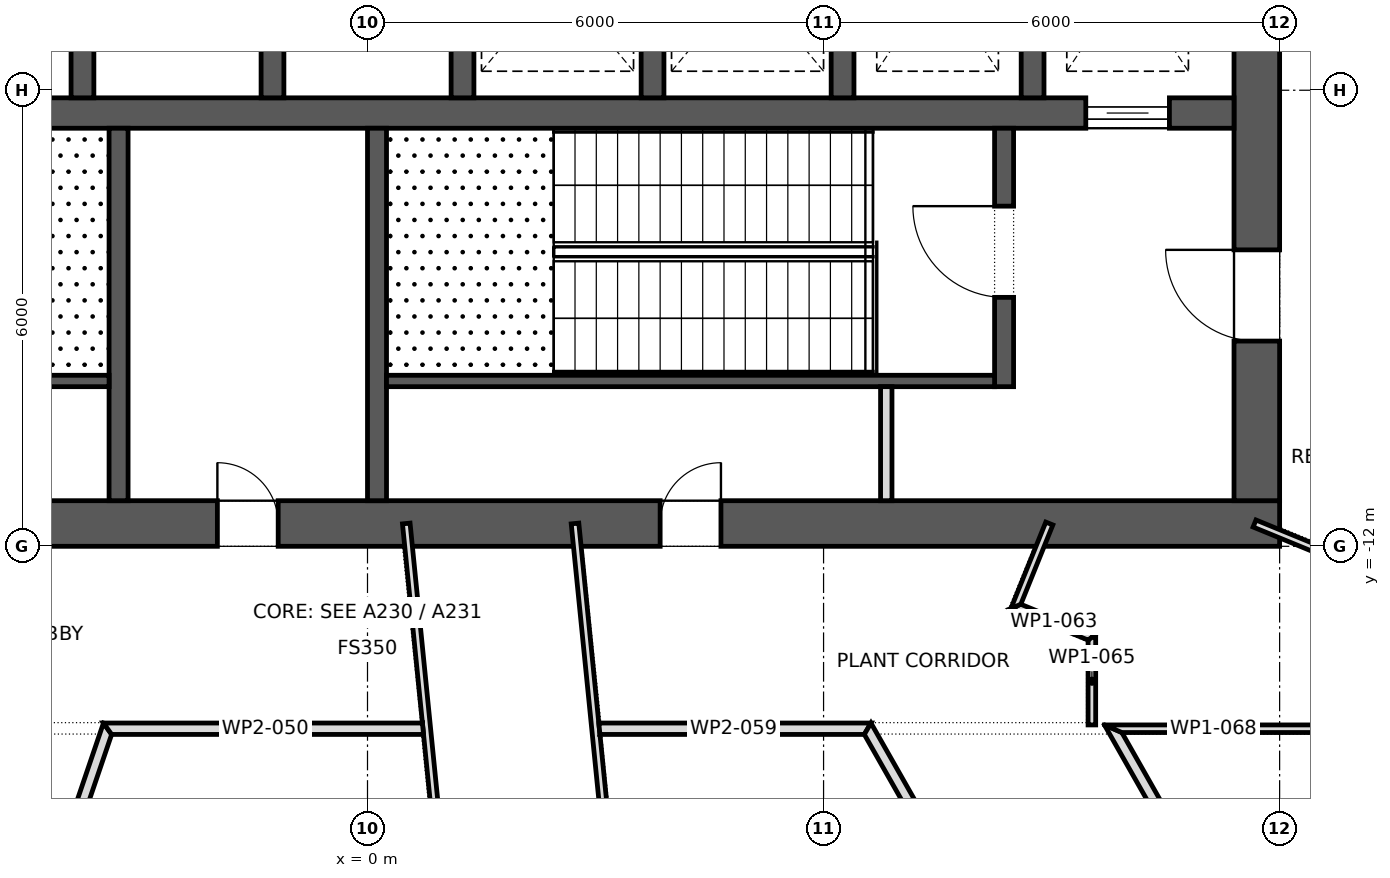
"""IFC4 building model, lengths in metres.
Left out: names, types, materials, properties, quantities, classifications, styles, units other than length and angle.
Written with IfcOpenShell. Run it as: python <this file> out.ifc"""

import sys

from ifc_helpers import new_model, si_unit, direction, frame, frame_2d, origin, place, context, subcontext, project, spatial, polyline, rectangle, outline, extrude, element, fill, save


model = new_model("IFC4")
c1 = context("Model", 3, precision=1e-05, world=origin(), true_north=direction((0.0, 1.0)))
c2 = subcontext(c1, "Body", "Model", "MODEL_VIEW")
j1 = project(units=[si_unit("LENGTHUNIT", "METRE"), si_unit("PLANEANGLEUNIT", "RADIAN")], contexts=[c1])
p1 = place(None, origin())
s1 = spatial("IfcSite", under=j1, at=p1, CompositionType="ELEMENT")
p2 = place(p1, origin())
s2 = spatial("IfcBuilding", under=s1, at=p2, CompositionType="ELEMENT")
p3 = place(p2, frame((0.0, 0.0, 99.1)))
s3 = spatial("IfcBuildingStorey", under=s2, at=p3, CompositionType="ELEMENT", Elevation=99.1)
p4 = place(p3, frame((-12.0, -11.7, 0.0), z_axis=(0.0, 0.0, 1.0), x_axis=(1.0, 0.0, 0.0)))
e1 = element("IfcWall", 1, at=p4, inside=s3, PredefinedType="SHEAR", context=c2, shape_type="SweptSolid", body=[
    extrude(rectangle(XDim=24.0, YDim=0.6, at=frame_2d((12.0, 0.0))), origin(), (0.0, 0.0, 1.0), 5.4),
])
p5 = place(p4, frame((10.025, 0.0, 0.0)))
e2 = element("IfcOpeningElement", 2, at=p5, cuts=e1, PredefinedType="OPENING", context=c2, shape_type="SweptSolid", body=[
    extrude(rectangle(XDim=0.8, YDim=2.1, at=frame_2d((0.4, 1.05))), frame((0.0, 0.312, 0.0), z_axis=(0.0, -1.0, 0.0), x_axis=(1.0, 0.0, 0.0)), (0.0, 0.0, 1.0), 0.624),
])
p6 = place(p4, frame((4.2, 0.0, 0.0)))
e3 = element("IfcOpeningElement", 3, at=p6, cuts=e1, PredefinedType="OPENING", context=c2, shape_type="SweptSolid", body=[
    extrude(rectangle(XDim=0.8, YDim=2.1, at=frame_2d((0.4, 1.05))), frame((0.0, 0.312, 0.0), z_axis=(0.0, -1.0, 0.0), x_axis=(1.0, 0.0, 0.0)), (0.0, 0.0, 1.0), 0.624),
])
p7 = place(p4, frame((15.85, 0.0, 0.0)))
e4 = element("IfcOpeningElement", 4, at=p7, cuts=e1, PredefinedType="OPENING", context=c2, shape_type="SweptSolid", body=[
    extrude(rectangle(XDim=0.8, YDim=2.1, at=frame_2d((0.4, 1.05))), frame((0.0, 0.312, 0.0), z_axis=(0.0, -1.0, 0.0), x_axis=(1.0, 0.0, 0.0)), (0.0, 0.0, 1.0), 0.624),
])
p8 = place(p3, frame((11.7, -11.4, 0.0), z_axis=(0.0, 0.0, 1.0), x_axis=(0.0, 1.0, 0.0)))
e5 = element("IfcWall", 5, at=p8, inside=s3, PredefinedType="SHEAR", context=c2, shape_type="SweptSolid", body=[
    extrude(rectangle(XDim=22.8, YDim=0.6, at=frame_2d((11.4, 0.0))), origin(), (0.0, 0.0, 1.0), 5.4),
])
p9 = place(p8, frame((10.2, 0.0, 0.0)))
e6 = element("IfcOpeningElement", 6, at=p9, cuts=e5, PredefinedType="OPENING", context=c2, shape_type="SweptSolid", body=[
    extrude(rectangle(XDim=2.4, YDim=2.1, at=frame_2d((1.2, 1.05))), frame((0.0, 0.312, 0.0), z_axis=(0.0, -1.0, 0.0), x_axis=(1.0, 0.0, 0.0)), (0.0, 0.0, 1.0), 0.624),
])
p10 = place(p8, frame((19.5, 0.0, 0.0)))
e7 = element("IfcOpeningElement", 7, at=p10, cuts=e5, PredefinedType="OPENING", context=c2, shape_type="SweptSolid", body=[
    extrude(rectangle(XDim=1.2, YDim=2.1, at=frame_2d((0.6, 1.05))), frame((0.0, 0.312, 0.0), z_axis=(0.0, -1.0, 0.0), x_axis=(1.0, 0.0, 0.0)), (0.0, 0.0, 1.0), 0.624),
])
p11 = place(p8, frame((2.1, 0.0, 0.0)))
e8 = element("IfcOpeningElement", 8, at=p11, cuts=e5, PredefinedType="OPENING", context=c2, shape_type="SweptSolid", body=[
    extrude(rectangle(XDim=1.2, YDim=2.1, at=frame_2d((0.6, 1.05))), frame((0.0, 0.312, 0.0), z_axis=(0.0, -1.0, 0.0), x_axis=(1.0, 0.0, 0.0)), (0.0, 0.0, 1.0), 0.624),
])
p12 = place(p3, frame((-11.4, -6.3, 0.0), z_axis=(0.0, 0.0, 1.0), x_axis=(1.0, 0.0, 0.0)))
e9 = element("IfcWall", 9, at=p12, inside=s3, PredefinedType="SHEAR", context=c2, shape_type="SweptSolid", body=[
    extrude(rectangle(XDim=22.8, YDim=0.4, at=frame_2d((11.4, 0.0))), origin(), (0.0, 0.0, 1.0), 5.4),
])
p13 = place(p12, frame((20.85, 0.0, 0.0)))
e10 = element("IfcOpeningElement", 10, at=p13, cuts=e9, PredefinedType="OPENING", context=c2, shape_type="SweptSolid", body=[
    extrude(rectangle(XDim=1.1, YDim=2.1, at=frame_2d((0.55, 1.05))), frame((0.0, 0.212, 0.0), z_axis=(0.0, -1.0, 0.0), x_axis=(1.0, 0.0, 0.0)), (0.0, 0.0, 1.0), 0.424),
])
for number, where, z_axis, x_axis in (
    (11, (-3.75, -6.1, 0.0), (0.0, 0.0, 1.0), (0.0, 1.0, 0.0)),
    (12, (-1.25, -6.1, 0.0), (0.0, 0.0, 1.0), (0.0, 1.0, 0.0)),
    (13, (1.25, -6.1, 0.0), (0.0, 0.0, 1.0), (0.0, 1.0, 0.0)),
    (14, (3.75, -6.1, 0.0), (0.0, 0.0, 1.0), (0.0, 1.0, 0.0)),
    (15, (6.25, -6.1, 0.0), (0.0, 0.0, 1.0), (0.0, 1.0, 0.0)),
    (16, (8.75, -6.1, 0.0), (0.0, 0.0, 1.0), (0.0, 1.0, 0.0)),
):
    element("IfcWall", number, at=place(p3, frame(where, z_axis=z_axis, x_axis=x_axis)), inside=s3, PredefinedType="SHEAR", context=c2, shape_type="SweptSolid", body=[
        extrude(rectangle(XDim=2.9, YDim=0.3, at=frame_2d((1.45, 0.0))), origin(), (0.0, 0.0, 1.0), 5.4),
    ])
for number, where, z_axis, x_axis in (
    (17, (-3.275, -11.4, 0.0), (0.0, 0.0, 1.0), (0.0, 1.0, 0.0)),
    (18, (0.125, -11.4, 0.0), (0.0, 0.0, 1.0), (0.0, 1.0, 0.0)),
):
    element("IfcWall", number, at=place(p3, frame(where, z_axis=z_axis, x_axis=x_axis)), inside=s3, PredefinedType="SHEAR", context=c2, shape_type="SweptSolid", body=[
        extrude(rectangle(XDim=4.9, YDim=0.25, at=frame_2d((2.45, 0.0))), origin(), (0.0, 0.0, 1.0), 5.1),
    ])
p14 = place(p3, frame((8.375, -9.9, 0.0), z_axis=(0.0, 0.0, 1.0), x_axis=(0.0, 1.0, 0.0)))
e19 = element("IfcWall", 19, at=p14, inside=s3, PredefinedType="SHEAR", context=c2, shape_type="SweptSolid", body=[
    extrude(rectangle(XDim=3.4, YDim=0.25, at=frame_2d((1.7, 0.0))), origin(), (0.0, 0.0, 1.0), 5.1),
])
p15 = place(p14, frame((1.175, 0.0, 0.0)))
e20 = element("IfcOpeningElement", 20, at=p15, cuts=e19, PredefinedType="OPENING", context=c2, shape_type="SweptSolid", body=[
    extrude(rectangle(XDim=1.2, YDim=2.1, at=frame_2d((0.6, 1.05))), frame((0.0, 0.137, 0.0), z_axis=(0.0, -1.0, 0.0), x_axis=(1.0, 0.0, 0.0)), (0.0, 0.0, 1.0), 0.274),
])
for number, where, z_axis, x_axis in (
    (21, (-11.4, -9.825, 0.0), (0.0, 0.0, 1.0), (1.0, 0.0, 0.0)),
    (22, (0.25, -9.825, 0.0), (0.0, 0.0, 1.0), (1.0, 0.0, 0.0)),
):
    element("IfcWall", number, at=place(p3, frame(where, z_axis=z_axis, x_axis=x_axis)), inside=s3, PredefinedType="SHEAR", context=c2, shape_type="SweptSolid", body=[
        extrude(rectangle(XDim=8.0, YDim=0.15, at=frame_2d((4.0, 0.0))), origin(), (0.0, 0.0, 1.0), 5.1),
    ])
p16 = place(p3, frame((6.825, -11.4, 0.0), z_axis=(0.0, 0.0, 1.0), x_axis=(0.0, 1.0, 0.0)))
e23 = element("IfcWall", 23, at=p16, inside=s3, PredefinedType="PARTITIONING", context=c2, shape_type="SweptSolid", body=[
    extrude(rectangle(XDim=1.5, YDim=0.15, at=frame_2d((0.75, 0.0))), origin(), (0.0, 0.0, 1.0), 5.1),
])
p17 = place(p3, frame((-3.403, -14.349, 0.0), z_axis=(0.0, 0.0, 1.0), x_axis=(-0.32208303293, -0.946711423771, 0.0)))
e24 = element("IfcWall", 24, at=p17, inside=s3, PredefinedType="PARTITIONING", context=c2, shape_type="SweptSolid", body=[
    extrude(outline(polyline([(0.0, -0.075), (1.994, -0.075), (3.988, -0.075), (5.982, -0.075), (7.976, -0.075), (9.97, -0.075), (11.964, -0.075), (13.958, -0.075), (13.782, 0.075), (11.829, 0.075), (9.875, 0.075), (7.922, 0.075), (5.968, 0.075), (4.015, 0.075), (2.061, 0.075), (0.107, 0.075), (0.0, -0.075)])), origin(), (0.0, 0.0, 1.0), 5.1),
])
p18 = place(p17, frame((6.462, 0.0, 0.0)))
e25 = element("IfcOpeningElement", 25, at=p18, cuts=e24, PredefinedType="OPENING", context=c2, shape_type="SweptSolid", body=[
    extrude(rectangle(XDim=1.0, YDim=2.1, at=frame_2d((0.5, 1.05))), frame((0.0, 0.087, 0.0), z_axis=(0.0, -1.0, 0.0), x_axis=(1.0, 0.0, 0.0)), (0.0, 0.0, 1.0), 0.174),
])
p19 = place(p3, frame((0.51, -11.7, 0.0), z_axis=(0.0, 0.0, 1.0), x_axis=(0.09951245757, -0.995036316316, 0.0)))
e26 = element("IfcWall", 26, at=p19, inside=s3, PredefinedType="PARTITIONING", context=c2, shape_type="SweptSolid", body=[
    extrude(outline(polyline([(0.0, -0.05), (1.317, -0.05), (2.633, -0.05), (2.633, -0.05), (2.636, -0.05), (4.625, -0.05), (6.615, -0.05), (8.604, -0.05), (10.594, -0.05), (12.583, -0.05), (14.573, -0.05), (16.562, -0.05), (16.568, 0.011), (16.593, 0.009), (16.597, 0.045), (16.597, 0.05), (14.753, 0.05), (12.909, 0.05), (11.065, 0.05), (9.22, 0.05), (7.376, 0.05), (5.532, 0.05), (3.688, 0.05), (1.844, 0.05), (0.0, 0.05), (0.0, -0.05)])), origin(), (0.0, 0.0, 1.0), 5.1),
])
p20 = place(p3, frame((0.737, -14.4, 0.0), z_axis=(0.0, 0.0, 1.0), x_axis=(-1.0, 0.0, 0.0)))
e27 = element("IfcWall", 27, at=p20, inside=s3, PredefinedType="PARTITIONING", context=c2, shape_type="SweptSolid", body=[
    extrude(outline(polyline([(4.211, -0.075), (4.211, -0.075), (4.157, 0.0), (4.104, 0.075), (2.736, 0.075), (1.368, 0.075), (0.0, 0.075), (0.0, 0.073), (0.015, -0.075), (1.413, -0.075), (2.812, -0.075), (4.211, -0.075)])), origin(), (0.0, 0.0, 1.0), 5.1),
])
p21 = place(p3, frame((2.73, -11.7, 0.0), z_axis=(0.0, 0.0, 1.0), x_axis=(0.099620052523, -0.995025549991, 0.0)))
e28 = element("IfcWall", 28, at=p21, inside=s3, PredefinedType="PARTITIONING", context=c2, shape_type="SweptSolid", body=[
    extrude(outline(polyline([(16.415, -0.05), (16.415, -0.042), (16.412, -0.003), (16.415, -0.003), (16.415, -0.003), (16.387, -0.005), (16.383, 0.05), (14.442, 0.05), (12.5, 0.05), (10.559, 0.05), (8.618, 0.05), (6.677, 0.05), (4.735, 0.05), (2.794, 0.05), (2.794, 0.05), (2.788, 0.05), (1.394, 0.05), (0.0, 0.05), (0.0, -0.05), (1.824, -0.05), (3.648, -0.05), (5.472, -0.05), (7.295, -0.05), (9.119, -0.05), (10.943, -0.05), (12.767, -0.05), (14.591, -0.05), (16.415, -0.05)])), origin(), (0.0, 0.0, 1.0), 5.1),
])
p22 = place(p3, frame((6.624, -14.4, 0.0), z_axis=(0.0, 0.0, 1.0), x_axis=(-1.0, 0.0, 0.0)))
e29 = element("IfcWall", 29, at=p22, inside=s3, PredefinedType="PARTITIONING", context=c2, shape_type="SweptSolid", body=[
    extrude(outline(polyline([(3.58, -0.075), (3.58, -0.071), (3.565, 0.075), (1.826, 0.075), (0.087, 0.075), (0.043, 0.0), (0.0, -0.075), (0.0, -0.075), (1.79, -0.075), (3.58, -0.075)])), origin(), (0.0, 0.0, 1.0), 5.1),
])
p23 = place(p3, frame((6.558, -14.362, 0.0), z_axis=(0.0, 0.0, 1.0), x_axis=(0.494364889709, -0.869254482774, 0.0)))
e30 = element("IfcWall", 30, at=p23, inside=s3, PredefinedType="PARTITIONING", context=c2, shape_type="SweptSolid", body=[
    extrude(outline(polyline([(0.087, -0.075), (1.971, -0.075), (3.854, -0.075), (5.737, -0.075), (7.621, -0.075), (9.504, -0.075), (11.387, -0.075), (13.271, -0.075), (13.45, 0.075), (11.529, 0.075), (9.607, 0.075), (7.686, 0.075), (5.764, 0.075), (3.843, 0.075), (1.922, 0.075), (0.0, 0.075), (0.087, -0.075)])), origin(), (0.0, 0.0, 1.0), 5.1),
])
p24 = place(p3, frame((8.484, -12.771, 0.0), z_axis=(0.0, 0.0, 1.0), x_axis=(0.92524601645, -0.379367643644, 0.0)))
e31 = element("IfcWall", 31, at=p24, inside=s3, PredefinedType="PARTITIONING", context=c2, shape_type="SweptSolid", body=[
    extrude(outline(polyline([(0.0, -0.05), (1.097, -0.05), (1.164, 0.05), (1.164, 0.05), (0.1, 0.05), (0.0, -0.05)])), origin(), (0.0, 0.0, 1.0), 5.1),
])
p25 = place(p3, frame((8.97, -11.7, 0.0), z_axis=(0.0, 0.0, 1.0), x_axis=(-0.374206059245, -0.927345580258, 0.0)))
e32 = element("IfcWall", 32, at=p25, inside=s3, PredefinedType="PARTITIONING", context=c2, shape_type="SweptSolid", body=[
    extrude(outline(polyline([(0.0, -0.05), (1.225, -0.05), (1.126, 0.05), (0.0, 0.05), (0.0, -0.05)])), origin(), (0.0, 0.0, 1.0), 5.1),
])
p26 = place(p3, frame((9.53, -13.167, 0.0), z_axis=(0.0, 0.0, 1.0), x_axis=(0.0, -1.0, 0.0)))
e33 = element("IfcWall", 33, at=p26, inside=s3, PredefinedType="PARTITIONING", context=c2, shape_type="SweptSolid", body=[
    extrude(outline(polyline([(0.0, 0.05), (0.0, 0.05), (0.067, -0.05), (1.184, -0.05), (1.184, 0.05), (0.0, 0.05)])), origin(), (0.0, 0.0, 1.0), 5.1),
])
p27 = place(p3, frame((9.76, -14.313, 0.0), z_axis=(0.0, 0.0, 1.0), x_axis=(0.493758679804, -0.869598968558, 0.0)))
e34 = element("IfcWall", 34, at=p27, inside=s3, PredefinedType="PARTITIONING", context=c2, shape_type="SweptSolid", body=[
    extrude(outline(polyline([(0.0, -0.075), (1.773, -0.075), (3.547, -0.075), (5.32, -0.075), (7.094, -0.075), (8.867, -0.075), (10.641, -0.075), (12.414, -0.075), (12.264, 0.075), (10.54, 0.075), (8.817, 0.075), (7.094, 0.075), (5.37, 0.075), (3.647, 0.075), (1.923, 0.075), (0.2, 0.075), (0.0, -0.075), (0.0, -0.075)])), origin(), (0.0, 0.0, 1.0), 5.1),
])
p28 = place(p3, frame((9.695, -14.4, 0.0), z_axis=(0.0, 0.0, 1.0), x_axis=(1.0, 0.0, 0.0)))
e35 = element("IfcWall", 35, at=p28, inside=s3, PredefinedType="PARTITIONING", context=c2, shape_type="SweptSolid", body=[
    extrude(outline(polyline([(0.229, -0.05), (1.487, -0.05), (2.745, -0.05), (2.765, 0.05), (1.382, 0.05), (0.0, 0.05), (0.0, 0.05), (0.229, -0.05)])), origin(), (0.0, 0.0, 1.0), 5.1),
])
p29 = place(p3, frame((11.67, -11.7, 0.0), z_axis=(0.0, 0.0, 1.0), x_axis=(0.925020199912, -0.379917925025, 0.0)))
e36 = element("IfcWall", 36, at=p29, inside=s3, PredefinedType="PARTITIONING", context=c2, shape_type="SweptSolid", body=[
    extrude(outline(polyline([(0.0, 0.05), (0.0, -0.05), (1.721, -0.05), (3.442, -0.05), (5.163, -0.05), (6.884, -0.05), (8.605, -0.05), (10.326, -0.05), (12.047, -0.05), (12.047, 0.05), (10.326, 0.05), (8.605, 0.05), (6.884, 0.05), (5.163, 0.05), (3.442, 0.05), (1.721, 0.05), (0.0, 0.05)])), origin(), (0.0, 0.0, 1.0), 5.1),
])
p30 = place(p13, origin())
e37 = element("IfcDoor", 37, at=p30, inside=s3, OperationType="SLIDING_TO_LEFT", PredefinedType="DOOR", context=c2, shape_type="SweptSolid", body=[
    extrude(rectangle(XDim=1.1, YDim=2.1, at=frame_2d((0.55, 1.05))), frame((0.0, 0.025, 0.0), z_axis=(0.0, -1.0, 0.0), x_axis=(1.0, 0.0, 0.0)), (0.0, 0.0, 1.0), 0.05),
])
fill(e10, e37)
p31 = place(p15, origin())
e38 = element("IfcDoor", 38, at=p31, inside=s3, OperationType="SINGLE_SWING_LEFT", PredefinedType="DOOR", context=c2, shape_type="SweptSolid", body=[
    extrude(rectangle(XDim=1.2, YDim=2.1, at=frame_2d((0.6, 1.05))), frame((0.0, 0.025, 0.0), z_axis=(0.0, -1.0, 0.0), x_axis=(1.0, 0.0, 0.0)), (0.0, 0.0, 1.0), 0.05),
])
fill(e20, e38)
p32 = place(p11, origin())
e39 = element("IfcDoor", 39, at=p32, inside=s3, OperationType="SINGLE_SWING_LEFT", PredefinedType="DOOR", context=c2, shape_type="SweptSolid", body=[
    extrude(rectangle(XDim=1.2, YDim=2.1, at=frame_2d((0.6, 1.05))), frame((0.0, 0.025, 0.0), z_axis=(0.0, -1.0, 0.0), x_axis=(1.0, 0.0, 0.0)), (0.0, 0.0, 1.0), 0.05),
])
fill(e8, e39)
p33 = place(p5, origin())
e40 = element("IfcDoor", 40, at=p33, inside=s3, OperationType="SINGLE_SWING_RIGHT", PredefinedType="DOOR", context=c2, shape_type="SweptSolid", body=[
    extrude(rectangle(XDim=0.8, YDim=2.1, at=frame_2d((0.4, 1.05))), frame((0.0, 0.025, 0.0), z_axis=(0.0, -1.0, 0.0), x_axis=(1.0, 0.0, 0.0)), (0.0, 0.0, 1.0), 0.05),
])
fill(e2, e40)
p34 = place(p7, origin())
e41 = element("IfcDoor", 41, at=p34, inside=s3, OperationType="SINGLE_SWING_LEFT", PredefinedType="DOOR", context=c2, shape_type="SweptSolid", body=[
    extrude(rectangle(XDim=0.8, YDim=2.1, at=frame_2d((0.4, 1.05))), frame((0.0, 0.025, 0.0), z_axis=(0.0, -1.0, 0.0), x_axis=(1.0, 0.0, 0.0)), (0.0, 0.0, 1.0), 0.05),
])
fill(e4, e41)
save(model, sys.argv[1])
